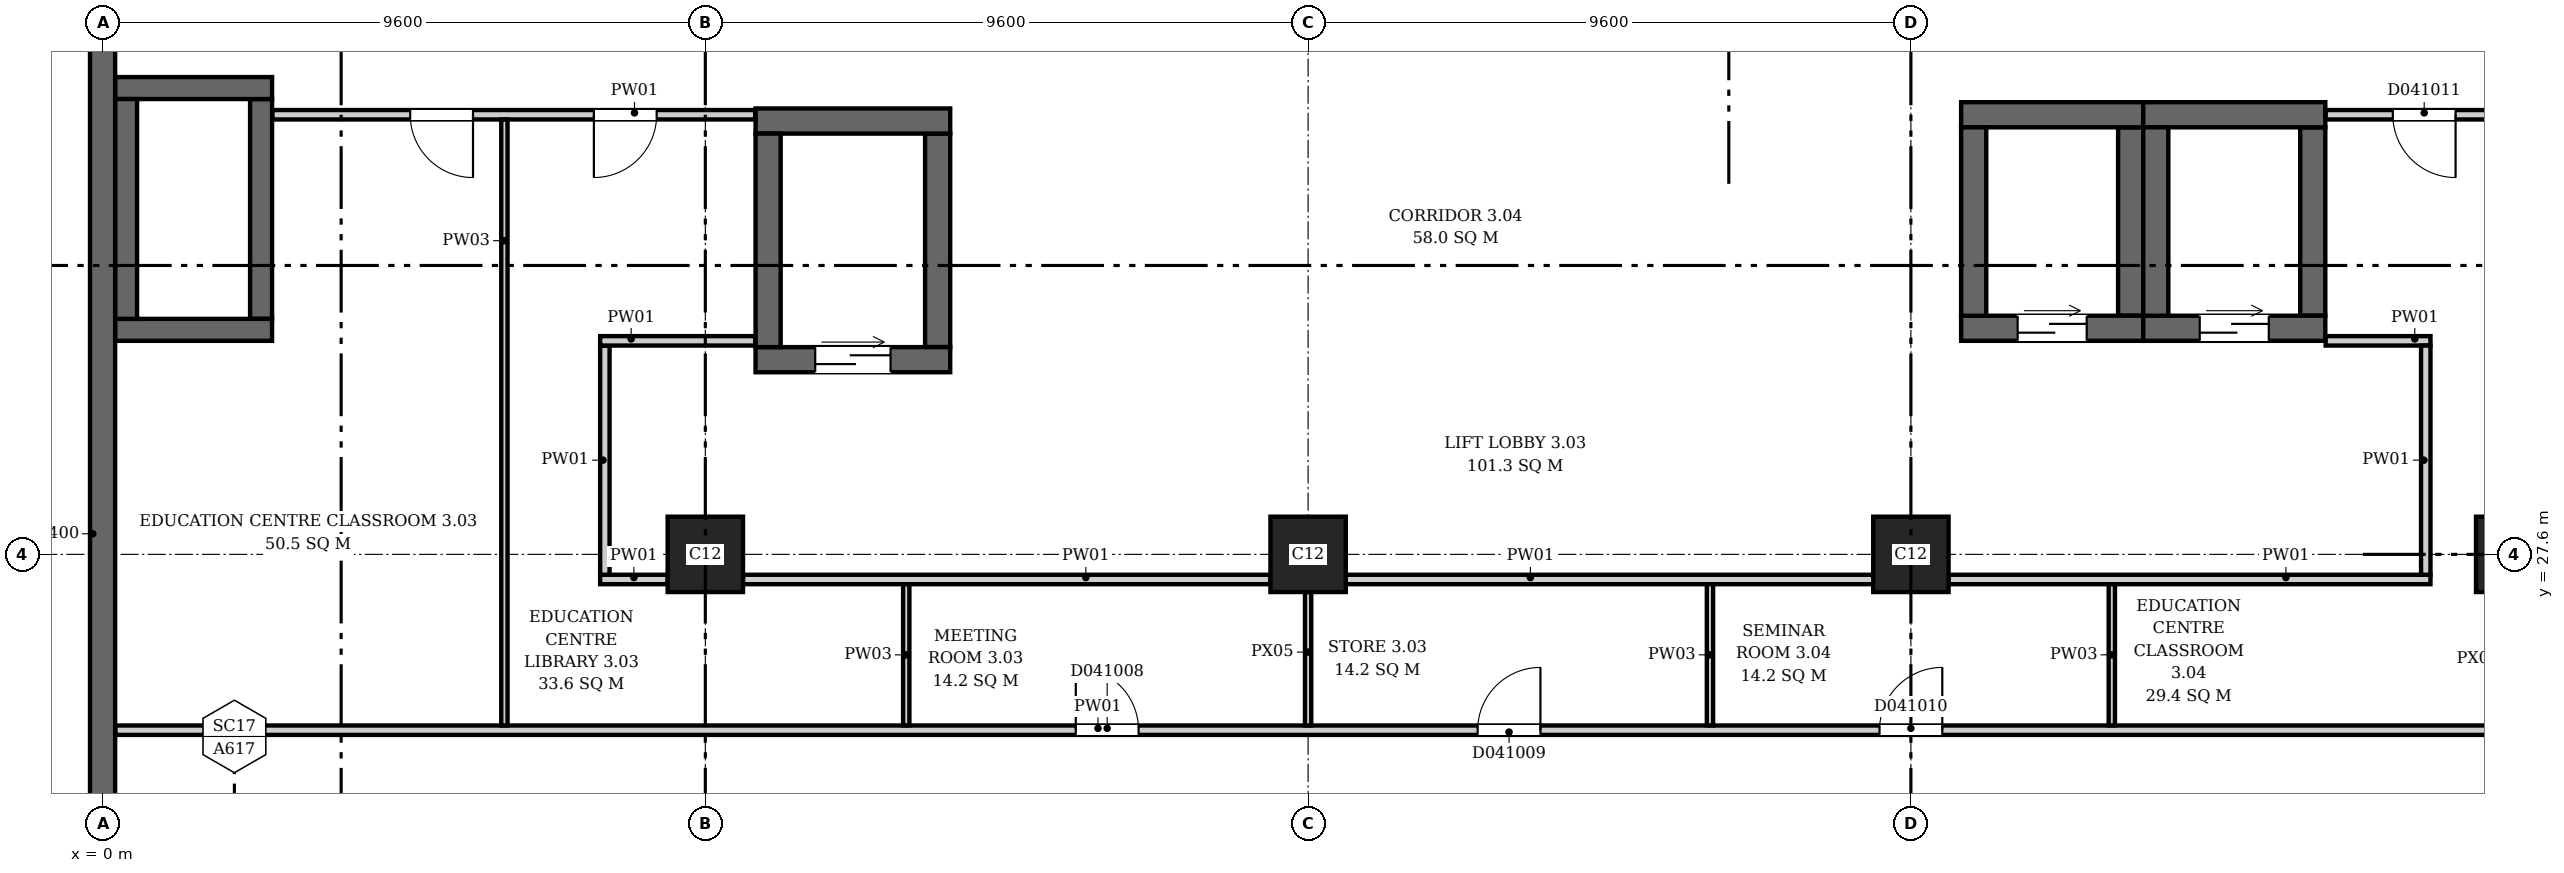
"""IFC4 building model, lengths in metres.
Left out: names, types, materials, properties, quantities, classifications, styles, units other than length and angle.
Written with IfcOpenShell. Run it as: python <this file> out.ifc"""

import sys

from ifc_helpers import new_model, si_unit, direction, frame, frame_2d, origin, origin_2d, place, context, subcontext, project, spatial, rectangle, extrude, element, fill, save


model = new_model("IFC4")
c1 = context("Model", 3, precision=1e-05, world=origin(), true_north=direction((0.0, 1.0)))
c2 = subcontext(c1, "Body", "Model", "MODEL_VIEW")
j1 = project(units=[si_unit("LENGTHUNIT", "METRE"), si_unit("PLANEANGLEUNIT", "RADIAN")], contexts=[c1])
p1 = place(None, origin())
s1 = spatial("IfcSite", under=j1, at=p1, CompositionType="ELEMENT")
p2 = place(p1, origin())
s2 = spatial("IfcBuilding", under=s1, at=p2, CompositionType="ELEMENT")
p3 = place(p2, frame((0.0, 0.0, 21.7)))
s3 = spatial("IfcBuildingStorey", under=s2, at=p3, CompositionType="ELEMENT", Elevation=21.7)
p4 = place(p3, frame((0.0, -0.2, 0.0), z_axis=(0.0, 0.0, 1.0), x_axis=(0.0, 1.0, 0.0)))
e1 = element("IfcWall", 1, at=p4, inside=s3, PredefinedType="SHEAR", context=c2, shape_type="SweptSolid", body=[
    extrude(rectangle(XDim=46.88, YDim=0.4, at=frame_2d((23.44, 0.0))), origin(), (0.0, 0.0, 1.0), 5.0),
])
for number, where, z_axis, x_axis in (
    (2, (0.2, 31.175, 0.0), (0.0, 0.0, 1.0), (1.0, 0.0, 0.0)),
    (3, (0.2, 35.025, 0.0), (0.0, 0.0, 1.0), (1.0, 0.0, 0.0)),
):
    element("IfcWall", number, at=place(p3, frame(where, z_axis=z_axis, x_axis=x_axis)), inside=s3, PredefinedType="SHEAR", context=c2, shape_type="SweptSolid", body=[
        extrude(rectangle(XDim=2.5, YDim=0.35, at=frame_2d((1.25, 0.0))), origin(), (0.0, 0.0, 1.0), 5.0),
    ])
for number, where, z_axis, x_axis in (
    (4, (0.375, 31.35, 0.0), (0.0, 0.0, 1.0), (0.0, 1.0, 0.0)),
    (5, (2.525, 31.35, 0.0), (0.0, 0.0, 1.0), (0.0, 1.0, 0.0)),
):
    element("IfcWall", number, at=place(p3, frame(where, z_axis=z_axis, x_axis=x_axis)), inside=s3, PredefinedType="SHEAR", context=c2, shape_type="SweptSolid", body=[
        extrude(rectangle(XDim=3.5, YDim=0.35, at=frame_2d((1.75, 0.0))), origin(), (0.0, 0.0, 1.0), 5.0),
    ])
p5 = place(p3, frame((10.4, 30.7, 0.0), z_axis=(0.0, 0.0, 1.0), x_axis=(1.0, 0.0, 0.0)))
e6 = element("IfcWall", 6, at=p5, inside=s3, PredefinedType="SHEAR", context=c2, shape_type="SweptSolid", body=[
    extrude(rectangle(XDim=3.1, YDim=0.4, at=frame_2d((1.55, 0.0))), origin(), (0.0, 0.0, 1.0), 5.0),
])
p6 = place(p5, frame((0.95, 0.0, 0.0)))
e7 = element("IfcOpeningElement", 7, at=p6, cuts=e6, PredefinedType="OPENING", context=c2, shape_type="SweptSolid", body=[
    extrude(rectangle(XDim=1.2, YDim=2.1, at=frame_2d((0.6, 1.05))), frame((0.0, 0.21, 0.0), z_axis=(0.0, -1.0, 0.0), x_axis=(1.0, 0.0, 0.0)), (0.0, 0.0, 1.0), 0.42),
])
p7 = place(p3, frame((10.4, 34.5, 0.0), z_axis=(0.0, 0.0, 1.0), x_axis=(1.0, 0.0, 0.0)))
e8 = element("IfcWall", 8, at=p7, inside=s3, PredefinedType="SHEAR", context=c2, shape_type="SweptSolid", body=[
    extrude(rectangle(XDim=3.1, YDim=0.4, at=frame_2d((1.55, 0.0))), origin(), (0.0, 0.0, 1.0), 5.0),
])
for number, where, z_axis, x_axis in (
    (9, (10.6, 30.9, 0.0), (0.0, 0.0, 1.0), (0.0, 1.0, 0.0)),
    (10, (13.3, 30.9, 0.0), (0.0, 0.0, 1.0), (0.0, 1.0, 0.0)),
):
    element("IfcWall", number, at=place(p3, frame(where, z_axis=z_axis, x_axis=x_axis)), inside=s3, PredefinedType="SHEAR", context=c2, shape_type="SweptSolid", body=[
        extrude(rectangle(XDim=3.4, YDim=0.4, at=frame_2d((1.7, 0.0))), origin(), (0.0, 0.0, 1.0), 5.0),
    ])
p8 = place(p3, frame((29.6, 31.2, 0.0), z_axis=(0.0, 0.0, 1.0), x_axis=(1.0, 0.0, 0.0)))
e11 = element("IfcWall", 11, at=p8, inside=s3, PredefinedType="SHEAR", context=c2, shape_type="SweptSolid", body=[
    extrude(rectangle(XDim=2.9, YDim=0.4, at=frame_2d((1.45, 0.0))), origin(), (0.0, 0.0, 1.0), 5.0),
])
p9 = place(p8, frame((0.9, 0.0, 0.0)))
e12 = element("IfcOpeningElement", 12, at=p9, cuts=e11, PredefinedType="OPENING", context=c2, shape_type="SweptSolid", body=[
    extrude(rectangle(XDim=1.1, YDim=2.1, at=frame_2d((0.55, 1.05))), frame((0.0, 0.21, 0.0), z_axis=(0.0, -1.0, 0.0), x_axis=(1.0, 0.0, 0.0)), (0.0, 0.0, 1.0), 0.42),
])
p10 = place(p3, frame((29.6, 34.6, 0.0), z_axis=(0.0, 0.0, 1.0), x_axis=(1.0, 0.0, 0.0)))
e13 = element("IfcWall", 13, at=p10, inside=s3, PredefinedType="SHEAR", context=c2, shape_type="SweptSolid", body=[
    extrude(rectangle(XDim=2.9, YDim=0.4, at=frame_2d((1.45, 0.0))), origin(), (0.0, 0.0, 1.0), 5.0),
])
for number, where, z_axis, x_axis in (
    (14, (29.8, 31.4, 0.0), (0.0, 0.0, 1.0), (0.0, 1.0, 0.0)),
    (15, (32.3, 31.4, 0.0), (0.0, 0.0, 1.0), (0.0, 1.0, 0.0)),
):
    element("IfcWall", number, at=place(p3, frame(where, z_axis=z_axis, x_axis=x_axis)), inside=s3, PredefinedType="SHEAR", context=c2, shape_type="SweptSolid", body=[
        extrude(rectangle(XDim=3.0, YDim=0.4, at=frame_2d((1.5, 0.0))), origin(), (0.0, 0.0, 1.0), 5.0),
    ])
p11 = place(p3, frame((32.5, 31.2, 0.0), z_axis=(0.0, 0.0, 1.0), x_axis=(1.0, 0.0, 0.0)))
e16 = element("IfcWall", 16, at=p11, inside=s3, PredefinedType="SHEAR", context=c2, shape_type="SweptSolid", body=[
    extrude(rectangle(XDim=2.9, YDim=0.4, at=frame_2d((1.45, 0.0))), origin(), (0.0, 0.0, 1.0), 5.0),
])
p12 = place(p11, frame((0.9, 0.0, 0.0)))
e17 = element("IfcOpeningElement", 17, at=p12, cuts=e16, PredefinedType="OPENING", context=c2, shape_type="SweptSolid", body=[
    extrude(rectangle(XDim=1.1, YDim=2.1, at=frame_2d((0.55, 1.05))), frame((0.0, 0.21, 0.0), z_axis=(0.0, -1.0, 0.0), x_axis=(1.0, 0.0, 0.0)), (0.0, 0.0, 1.0), 0.42),
])
p13 = place(p3, frame((32.5, 34.6, 0.0), z_axis=(0.0, 0.0, 1.0), x_axis=(1.0, 0.0, 0.0)))
e18 = element("IfcWall", 18, at=p13, inside=s3, PredefinedType="SHEAR", context=c2, shape_type="SweptSolid", body=[
    extrude(rectangle(XDim=2.9, YDim=0.4, at=frame_2d((1.45, 0.0))), origin(), (0.0, 0.0, 1.0), 5.0),
])
for number, where, z_axis, x_axis in (
    (19, (32.7, 31.4, 0.0), (0.0, 0.0, 1.0), (0.0, 1.0, 0.0)),
    (20, (35.2, 31.4, 0.0), (0.0, 0.0, 1.0), (0.0, 1.0, 0.0)),
):
    element("IfcWall", number, at=place(p3, frame(where, z_axis=z_axis, x_axis=x_axis)), inside=s3, PredefinedType="SHEAR", context=c2, shape_type="SweptSolid", body=[
        extrude(rectangle(XDim=3.0, YDim=0.4, at=frame_2d((1.5, 0.0))), origin(), (0.0, 0.0, 1.0), 5.0),
    ])
for number, where, z_axis, x_axis in (
    (21, (9.6, 27.6, 0.0), (0.0, 0.0, 1.0), (1.0, 0.0, 0.0)),
    (22, (19.2, 27.6, 0.0), (0.0, 0.0, 1.0), (1.0, 0.0, 0.0)),
    (23, (28.8, 27.6, 0.0), (0.0, 0.0, 1.0), (1.0, 0.0, 0.0)),
    (24, (38.4, 27.6, 0.0), (0.0, 0.0, 1.0), (1.0, 0.0, 0.0)),
):
    element("IfcColumn", number, at=place(p3, frame(where, z_axis=z_axis, x_axis=x_axis)), inside=s3, PredefinedType="COLUMN", context=c2, shape_type="SweptSolid", body=[
        extrude(rectangle(XDim=1.2, YDim=1.2, at=origin_2d()), origin(), (0.0, 0.0, 1.0), 5.0),
    ])
p14 = place(p3, frame((0.206, 24.8, 0.0), z_axis=(0.0, 0.0, 1.0), x_axis=(1.0, 0.0, 0.0)))
e25 = element("IfcWall", 25, at=p14, inside=s3, PredefinedType="PARTITIONING", context=c2, shape_type="SweptSolid", body=[
    extrude(rectangle(XDim=39.119, YDim=0.15, at=frame_2d((19.56, 0.0))), origin(), (0.0, 0.0, 1.0), 4.65),
])
p15 = place(p14, frame((15.294, 0.0, 0.0)))
e26 = element("IfcOpeningElement", 26, at=p15, cuts=e25, PredefinedType="OPENING", context=c2, shape_type="SweptSolid", body=[
    extrude(rectangle(XDim=1.0, YDim=2.1, at=frame_2d((0.5, 1.05))), frame((0.0, 0.085, 0.0), z_axis=(0.0, -1.0, 0.0), x_axis=(1.0, 0.0, 0.0)), (0.0, 0.0, 1.0), 0.17),
])
p16 = place(p14, frame((21.694, 0.0, 0.0)))
e27 = element("IfcOpeningElement", 27, at=p16, cuts=e25, PredefinedType="OPENING", context=c2, shape_type="SweptSolid", body=[
    extrude(rectangle(XDim=1.0, YDim=2.1, at=frame_2d((0.5, 1.05))), frame((0.0, 0.085, 0.0), z_axis=(0.0, -1.0, 0.0), x_axis=(1.0, 0.0, 0.0)), (0.0, 0.0, 1.0), 0.17),
])
p17 = place(p14, frame((28.094, 0.0, 0.0)))
e28 = element("IfcOpeningElement", 28, at=p17, cuts=e25, PredefinedType="OPENING", context=c2, shape_type="SweptSolid", body=[
    extrude(rectangle(XDim=1.0, YDim=2.1, at=frame_2d((0.5, 1.05))), frame((0.0, 0.085, 0.0), z_axis=(0.0, -1.0, 0.0), x_axis=(1.0, 0.0, 0.0)), (0.0, 0.0, 1.0), 0.17),
])
p18 = place(p3, frame((2.706, 34.6, 0.0), z_axis=(0.0, 0.0, 1.0), x_axis=(1.0, 0.0, 0.0)))
e29 = element("IfcWall", 29, at=p18, inside=s3, PredefinedType="PARTITIONING", context=c2, shape_type="SweptSolid", body=[
    extrude(rectangle(XDim=7.688, YDim=0.15, at=frame_2d((3.844, 0.0))), origin(), (0.0, 0.0, 1.0), 4.65),
])
p19 = place(p18, frame((2.194, 0.0, 0.0)))
e30 = element("IfcOpeningElement", 30, at=p19, cuts=e29, PredefinedType="OPENING", context=c2, shape_type="SweptSolid", body=[
    extrude(rectangle(XDim=1.0, YDim=2.1, at=frame_2d((0.5, 1.05))), frame((0.0, 0.085, 0.0), z_axis=(0.0, -1.0, 0.0), x_axis=(1.0, 0.0, 0.0)), (0.0, 0.0, 1.0), 0.17),
])
p20 = place(p18, frame((5.119, 0.0, 0.0)))
e31 = element("IfcOpeningElement", 31, at=p20, cuts=e29, PredefinedType="OPENING", context=c2, shape_type="SweptSolid", body=[
    extrude(rectangle(XDim=1.0, YDim=2.1, at=frame_2d((0.5, 1.05))), frame((0.0, 0.085, 0.0), z_axis=(0.0, -1.0, 0.0), x_axis=(1.0, 0.0, 0.0)), (0.0, 0.0, 1.0), 0.17),
])
p21 = place(p3, frame((6.4, 24.875, 0.0), z_axis=(0.0, 0.0, 1.0), x_axis=(0.0, 1.0, 0.0)))
e32 = element("IfcWall", 32, at=p21, inside=s3, PredefinedType="PARTITIONING", context=c2, shape_type="SweptSolid", body=[
    extrude(rectangle(XDim=9.65, YDim=0.1, at=frame_2d((4.825, 0.0))), origin(), (0.0, 0.0, 1.0), 4.65),
])
p22 = place(p3, frame((7.925, 27.2, 0.0), z_axis=(0.0, 0.0, 1.0), x_axis=(1.0, 0.0, 0.0)))
e33 = element("IfcWall", 33, at=p22, inside=s3, PredefinedType="PARTITIONING", context=c2, shape_type="SweptSolid", body=[
    extrude(rectangle(XDim=1.075, YDim=0.15, at=frame_2d((0.538, 0.0))), origin(), (0.0, 0.0, 1.0), 4.65),
])
p23 = place(p3, frame((8.0, 27.275, 0.0), z_axis=(0.0, 0.0, 1.0), x_axis=(0.0, 1.0, 0.0)))
e34 = element("IfcWall", 34, at=p23, inside=s3, PredefinedType="PARTITIONING", context=c2, shape_type="SweptSolid", body=[
    extrude(rectangle(XDim=3.65, YDim=0.15, at=frame_2d((1.825, 0.0))), origin(), (0.0, 0.0, 1.0), 4.65),
])
p24 = place(p3, frame((7.925, 31.0, 0.0), z_axis=(0.0, 0.0, 1.0), x_axis=(1.0, 0.0, 0.0)))
e35 = element("IfcWall", 35, at=p24, inside=s3, PredefinedType="PARTITIONING", context=c2, shape_type="SweptSolid", body=[
    extrude(rectangle(XDim=2.469, YDim=0.15, at=frame_2d((1.234, 0.0))), origin(), (0.0, 0.0, 1.0), 4.65),
])
p25 = place(p3, frame((10.2, 27.2, 0.0), z_axis=(0.0, 0.0, 1.0), x_axis=(1.0, 0.0, 0.0)))
e36 = element("IfcWall", 36, at=p25, inside=s3, PredefinedType="PARTITIONING", context=c2, shape_type="SweptSolid", body=[
    extrude(rectangle(XDim=8.4, YDim=0.15, at=frame_2d((4.2, 0.0))), origin(), (0.0, 0.0, 1.0), 4.65),
])
p26 = place(p3, frame((12.8, 24.875, 0.0), z_axis=(0.0, 0.0, 1.0), x_axis=(0.0, 1.0, 0.0)))
e37 = element("IfcWall", 37, at=p26, inside=s3, PredefinedType="PARTITIONING", context=c2, shape_type="SweptSolid", body=[
    extrude(rectangle(XDim=2.25, YDim=0.1, at=frame_2d((1.125, 0.0))), origin(), (0.0, 0.0, 1.0), 4.65),
])
p27 = place(p3, frame((19.2, 24.875, 0.0), z_axis=(0.0, 0.0, 1.0), x_axis=(0.0, 1.0, 0.0)))
e38 = element("IfcWall", 38, at=p27, inside=s3, PredefinedType="PARTITIONING", context=c2, shape_type="SweptSolid", body=[
    extrude(rectangle(XDim=2.125, YDim=0.1, at=frame_2d((1.062, 0.0))), origin(), (0.0, 0.0, 1.0), 4.25),
])
p28 = place(p3, frame((19.8, 27.2, 0.0), z_axis=(0.0, 0.0, 1.0), x_axis=(1.0, 0.0, 0.0)))
e39 = element("IfcWall", 39, at=p28, inside=s3, PredefinedType="PARTITIONING", context=c2, shape_type="SweptSolid", body=[
    extrude(rectangle(XDim=8.4, YDim=0.15, at=frame_2d((4.2, 0.0))), origin(), (0.0, 0.0, 1.0), 4.65),
])
p29 = place(p3, frame((25.6, 24.875, 0.0), z_axis=(0.0, 0.0, 1.0), x_axis=(0.0, 1.0, 0.0)))
e40 = element("IfcWall", 40, at=p29, inside=s3, PredefinedType="PARTITIONING", context=c2, shape_type="SweptSolid", body=[
    extrude(rectangle(XDim=2.25, YDim=0.1, at=frame_2d((1.125, 0.0))), origin(), (0.0, 0.0, 1.0), 4.65),
])
p30 = place(p3, frame((29.4, 27.2, 0.0), z_axis=(0.0, 0.0, 1.0), x_axis=(1.0, 0.0, 0.0)))
e41 = element("IfcWall", 41, at=p30, inside=s3, PredefinedType="PARTITIONING", context=c2, shape_type="SweptSolid", body=[
    extrude(rectangle(XDim=7.675, YDim=0.15, at=frame_2d((3.837, 0.0))), origin(), (0.0, 0.0, 1.0), 4.65),
])
p31 = place(p3, frame((32.0, 24.875, 0.0), z_axis=(0.0, 0.0, 1.0), x_axis=(0.0, 1.0, 0.0)))
e42 = element("IfcWall", 42, at=p31, inside=s3, PredefinedType="PARTITIONING", context=c2, shape_type="SweptSolid", body=[
    extrude(rectangle(XDim=2.25, YDim=0.1, at=frame_2d((1.125, 0.0))), origin(), (0.0, 0.0, 1.0), 4.65),
])
p32 = place(p3, frame((35.406, 31.0, 0.0), z_axis=(0.0, 0.0, 1.0), x_axis=(1.0, 0.0, 0.0)))
e43 = element("IfcWall", 43, at=p32, inside=s3, PredefinedType="PARTITIONING", context=c2, shape_type="SweptSolid", body=[
    extrude(rectangle(XDim=1.669, YDim=0.15, at=frame_2d((0.834, 0.0))), origin(), (0.0, 0.0, 1.0), 4.65),
])
p33 = place(p3, frame((35.406, 34.6, 0.0), z_axis=(0.0, 0.0, 1.0), x_axis=(1.0, 0.0, 0.0)))
e44 = element("IfcWall", 44, at=p33, inside=s3, PredefinedType="PARTITIONING", context=c2, shape_type="SweptSolid", body=[
    extrude(rectangle(XDim=21.988, YDim=0.15, at=frame_2d((10.994, 0.0))), origin(), (0.0, 0.0, 1.0), 4.65),
])
p34 = place(p33, frame((1.069, 0.0, 0.0)))
e45 = element("IfcOpeningElement", 45, at=p34, cuts=e44, PredefinedType="OPENING", context=c2, shape_type="SweptSolid", body=[
    extrude(rectangle(XDim=1.0, YDim=2.1, at=frame_2d((0.5, 1.05))), frame((0.0, 0.085, 0.0), z_axis=(0.0, -1.0, 0.0), x_axis=(1.0, 0.0, 0.0)), (0.0, 0.0, 1.0), 0.17),
])
p35 = place(p33, frame((5.694, 0.0, 0.0)))
e46 = element("IfcOpeningElement", 46, at=p35, cuts=e44, PredefinedType="OPENING", context=c2, shape_type="SweptSolid", body=[
    extrude(rectangle(XDim=1.0, YDim=2.1, at=frame_2d((0.5, 1.05))), frame((0.0, 0.085, 0.0), z_axis=(0.0, -1.0, 0.0), x_axis=(1.0, 0.0, 0.0)), (0.0, 0.0, 1.0), 0.17),
])
p36 = place(p33, frame((12.094, 0.0, 0.0)))
e47 = element("IfcOpeningElement", 47, at=p36, cuts=e44, PredefinedType="OPENING", context=c2, shape_type="SweptSolid", body=[
    extrude(rectangle(XDim=1.0, YDim=2.1, at=frame_2d((0.5, 1.05))), frame((0.0, 0.085, 0.0), z_axis=(0.0, -1.0, 0.0), x_axis=(1.0, 0.0, 0.0)), (0.0, 0.0, 1.0), 0.17),
])
p37 = place(p33, frame((18.318, 0.0, 0.0)))
e48 = element("IfcOpeningElement", 48, at=p37, cuts=e44, PredefinedType="OPENING", context=c2, shape_type="SweptSolid", body=[
    extrude(rectangle(XDim=1.0, YDim=2.1, at=frame_2d((0.5, 1.05))), frame((0.0, 0.085, 0.0), z_axis=(0.0, -1.0, 0.0), x_axis=(1.0, 0.0, 0.0)), (0.0, 0.0, 1.0), 0.17),
])
p38 = place(p3, frame((37.0, 27.275, 0.0), z_axis=(0.0, 0.0, 1.0), x_axis=(0.0, 1.0, 0.0)))
e49 = element("IfcWall", 49, at=p38, inside=s3, PredefinedType="PARTITIONING", context=c2, shape_type="SweptSolid", body=[
    extrude(rectangle(XDim=3.65, YDim=0.15, at=frame_2d((1.825, 0.0))), origin(), (0.0, 0.0, 1.0), 4.65),
])
p39 = place(p6, origin())
e50 = element("IfcDoor", 50, at=p39, inside=s3, OperationType="DOUBLE_DOOR_SLIDING", PredefinedType="DOOR", context=c2, shape_type="SweptSolid", body=[
    extrude(rectangle(XDim=1.2, YDim=2.1, at=frame_2d((0.6, 1.05))), frame((0.0, 0.025, 0.0), z_axis=(0.0, -1.0, 0.0), x_axis=(1.0, 0.0, 0.0)), (0.0, 0.0, 1.0), 0.05),
])
fill(e7, e50)
p40 = place(p9, origin())
e51 = element("IfcDoor", 51, at=p40, inside=s3, OperationType="DOUBLE_DOOR_SLIDING", PredefinedType="DOOR", context=c2, shape_type="SweptSolid", body=[
    extrude(rectangle(XDim=1.1, YDim=2.1, at=frame_2d((0.55, 1.05))), frame((0.0, 0.025, 0.0), z_axis=(0.0, -1.0, 0.0), x_axis=(1.0, 0.0, 0.0)), (0.0, 0.0, 1.0), 0.05),
])
fill(e12, e51)
p41 = place(p12, origin())
e52 = element("IfcDoor", 52, at=p41, inside=s3, OperationType="DOUBLE_DOOR_SLIDING", PredefinedType="DOOR", context=c2, shape_type="SweptSolid", body=[
    extrude(rectangle(XDim=1.1, YDim=2.1, at=frame_2d((0.55, 1.05))), frame((0.0, 0.025, 0.0), z_axis=(0.0, -1.0, 0.0), x_axis=(1.0, 0.0, 0.0)), (0.0, 0.0, 1.0), 0.05),
])
fill(e17, e52)
p42 = place(p19, origin())
e53 = element("IfcDoor", 53, at=p42, inside=s3, OperationType="SINGLE_SWING_RIGHT", PredefinedType="DOOR", context=c2, shape_type="SweptSolid", body=[
    extrude(rectangle(XDim=1.0, YDim=2.1, at=frame_2d((0.5, 1.05))), frame((0.0, 0.025, 0.0), z_axis=(0.0, -1.0, 0.0), x_axis=(1.0, 0.0, 0.0)), (0.0, 0.0, 1.0), 0.05),
])
fill(e30, e53)
p43 = place(p20, origin())
e54 = element("IfcDoor", 54, at=p43, inside=s3, OperationType="SINGLE_SWING_LEFT", PredefinedType="DOOR", context=c2, shape_type="SweptSolid", body=[
    extrude(rectangle(XDim=1.0, YDim=2.1, at=frame_2d((0.5, 1.05))), frame((0.0, 0.025, 0.0), z_axis=(0.0, -1.0, 0.0), x_axis=(1.0, 0.0, 0.0)), (0.0, 0.0, 1.0), 0.05),
])
fill(e31, e54)
p44 = place(p15, origin())
e55 = element("IfcDoor", 55, at=p44, inside=s3, OperationType="SINGLE_SWING_LEFT", PredefinedType="DOOR", context=c2, shape_type="SweptSolid", body=[
    extrude(rectangle(XDim=1.0, YDim=2.1, at=frame_2d((0.5, 1.05))), frame((0.0, 0.025, 0.0), z_axis=(0.0, -1.0, 0.0), x_axis=(1.0, 0.0, 0.0)), (0.0, 0.0, 1.0), 0.05),
])
fill(e26, e55)
p45 = place(p16, origin())
e56 = element("IfcDoor", 56, at=p45, inside=s3, OperationType="SINGLE_SWING_RIGHT", PredefinedType="DOOR", context=c2, shape_type="SweptSolid", body=[
    extrude(rectangle(XDim=1.0, YDim=2.1, at=frame_2d((0.5, 1.05))), frame((0.0, 0.025, 0.0), z_axis=(0.0, -1.0, 0.0), x_axis=(1.0, 0.0, 0.0)), (0.0, 0.0, 1.0), 0.05),
])
fill(e27, e56)
p46 = place(p17, origin())
e57 = element("IfcDoor", 57, at=p46, inside=s3, OperationType="SINGLE_SWING_RIGHT", PredefinedType="DOOR", context=c2, shape_type="SweptSolid", body=[
    extrude(rectangle(XDim=1.0, YDim=2.1, at=frame_2d((0.5, 1.05))), frame((0.0, 0.025, 0.0), z_axis=(0.0, -1.0, 0.0), x_axis=(1.0, 0.0, 0.0)), (0.0, 0.0, 1.0), 0.05),
])
fill(e28, e57)
p47 = place(p34, origin())
e58 = element("IfcDoor", 58, at=p47, inside=s3, OperationType="SINGLE_SWING_RIGHT", PredefinedType="DOOR", context=c2, shape_type="SweptSolid", body=[
    extrude(rectangle(XDim=1.0, YDim=2.1, at=frame_2d((0.5, 1.05))), frame((0.0, 0.025, 0.0), z_axis=(0.0, -1.0, 0.0), x_axis=(1.0, 0.0, 0.0)), (0.0, 0.0, 1.0), 0.05),
])
fill(e45, e58)
save(model, sys.argv[1])
